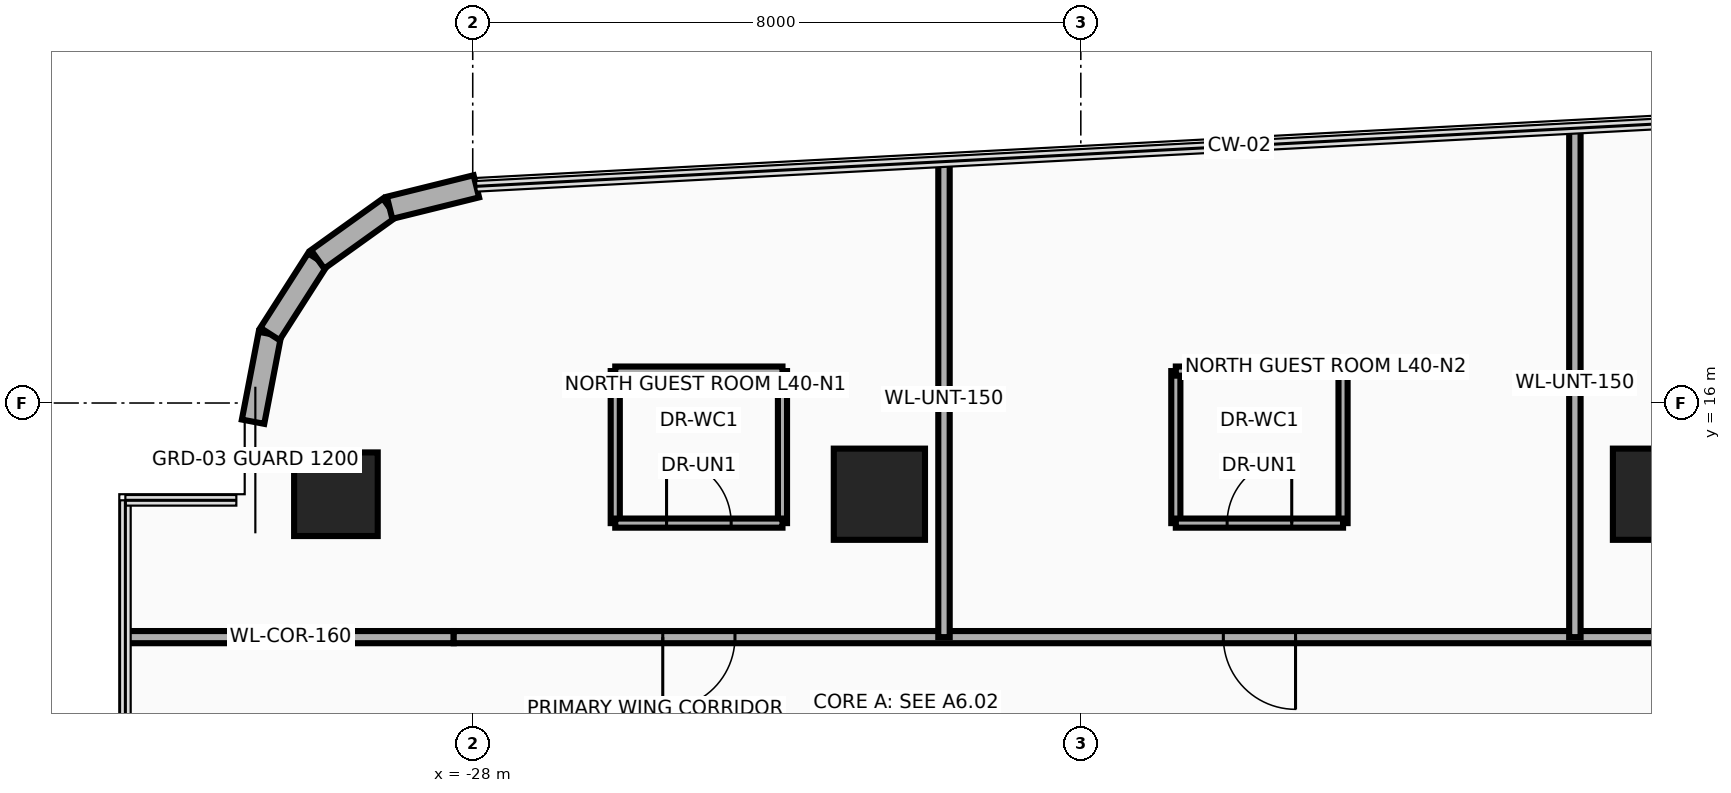
"""IFC4 building model, lengths in metres.
Left out: names, types, materials, properties, quantities, classifications, styles, units other than length and angle.
Written with IfcOpenShell. Run it as: python <this file> out.ifc"""

import sys

from ifc_helpers import new_model, si_unit, direction, frame, frame_2d, origin, origin_2d, place, context, subcontext, project, spatial, rectangle, circle, extrude, source, transform, mapped, element, fill, save


model = new_model("IFC4")
c1 = context("Model", 3, precision=1e-05, world=origin(), true_north=direction((0.0, 1.0)))
c2 = subcontext(c1, "Body", "Model", "MODEL_VIEW")
j1 = project(units=[si_unit("LENGTHUNIT", "METRE"), si_unit("PLANEANGLEUNIT", "RADIAN")], contexts=[c1])
p1 = place(None, origin())
s1 = spatial("IfcSite", under=j1, at=p1, CompositionType="ELEMENT")
p2 = place(p1, origin())
s2 = spatial("IfcBuilding", under=s1, at=p2, CompositionType="ELEMENT")
p3 = place(p2, frame((0.0, 0.0, 157.5)))
s3 = spatial("IfcBuildingStorey", under=s2, at=p3, CompositionType="ELEMENT", Elevation=157.5)
m1 = source(origin(), c2, "Body", "SweptSolid", [
    extrude(circle(Radius=0.55, at=origin_2d()), origin(), (0.0, 0.0, 1.0), 3.7),
])
p4 = place(p3, frame((-29.8, 14.8, 0.0), z_axis=(0.0, 0.0, 1.0), x_axis=(1.0, 0.0, 0.0)))
e1 = element("IfcColumn", 1, at=p4, inside=s3, PredefinedType="COLUMN", context=c2, shape_type="MappedRepresentation", body=[
    mapped(m1, transform((0.0, 0.0, 0.0), x_axis=(1.0, 0.0, 0.0), y_axis=(0.0, 1.0, 0.0), z_axis=(0.0, 0.0, 1.0), scale=1.0)),
])
m2 = source(origin(), c2, "Body", "SweptSolid", [
    extrude(rectangle(XDim=1.2, YDim=1.2, at=origin_2d()), origin(), (0.0, 0.0, 1.0), 3.7),
])
for number, where, z_axis, x_axis in (
    (2, (-22.65, 14.8, 0.0), (0.0, 0.0, 1.0), (1.0, 0.0, 0.0)),
    (3, (-12.4, 14.8, 0.0), (0.0, 0.0, 1.0), (1.0, 0.0, 0.0)),
):
    element("IfcColumn", number, at=place(p3, frame(where, z_axis=z_axis, x_axis=x_axis)), inside=s3, PredefinedType="COLUMN", context=c2, shape_type="MappedRepresentation", body=[
        mapped(m2, transform((0.0, 0.0, 0.0), x_axis=(1.0, 0.0, 0.0), y_axis=(0.0, 1.0, 0.0), z_axis=(0.0, 0.0, 1.0), scale=1.0)),
    ])
p5 = place(p3, frame((-30.89, 15.754, 0.0), z_axis=(0.0, 0.0, 1.0), x_axis=(0.188562397879, 0.982061210977, 0.0)))
e4 = element("IfcWall", 4, at=p5, inside=s3, PredefinedType="SOLIDWALL", context=c2, shape_type="SweptSolid", body=[
    extrude(rectangle(XDim=1.176, YDim=0.3, at=frame_2d((0.588, 0.0))), origin(), (0.0, 0.0, 1.0), 3.46),
])
for number, where, z_axis, x_axis in (
    (5, (-30.668, 16.909, 0.0), (0.0, 0.0, 1.0), (0.539, 0.842, 0.0)),
    (6, (-30.04, 17.89, 0.0), (0.0, 0.0, 1.0), (0.813, 0.583, 0.0)),
):
    element("IfcWall", number, at=place(p3, frame(where, z_axis=z_axis, x_axis=x_axis)), inside=s3, PredefinedType="SOLIDWALL", context=c2, shape_type="SweptSolid", body=[
        extrude(rectangle(XDim=1.165, YDim=0.3, at=frame_2d((0.583, 0.0))), origin(), (0.0, 0.0, 1.0), 3.46),
    ])
p6 = place(p3, frame((-29.094, 18.569, 0.0), z_axis=(0.0, 0.0, 1.0), x_axis=(0.970762249107, 0.24004302887, 0.0)))
e7 = element("IfcWall", 7, at=p6, inside=s3, PredefinedType="SOLIDWALL", context=c2, shape_type="SweptSolid", body=[
    extrude(rectangle(XDim=1.176, YDim=0.3, at=frame_2d((0.588, 0.0))), origin(), (0.0, 0.0, 1.0), 3.46),
])
p7 = place(p3, frame((-32.54, 12.92, 0.0), z_axis=(0.0, 0.0, 1.0), x_axis=(1.0, 0.0, 0.0)))
e8 = element("IfcWall", 8, at=p7, inside=s3, PredefinedType="PARTITIONING", context=c2, shape_type="SweptSolid", body=[
    extrude(rectangle(XDim=4.29, YDim=0.16, at=frame_2d((2.145, 0.0))), origin(), (0.0, 0.0, 1.0), 2.896),
])
p8 = place(p3, frame((-28.25, 12.92, 0.0), z_axis=(0.0, 0.0, 1.0), x_axis=(1.0, 0.0, 0.0)))
e9 = element("IfcWall", 9, at=p8, inside=s3, PredefinedType="PARTITIONING", context=c2, shape_type="SweptSolid", body=[
    extrude(rectangle(XDim=23.64, YDim=0.16, at=frame_2d((11.82, 0.0))), origin(), (0.0, 0.0, 1.0), 2.834),
])
p9 = place(p8, frame((2.75, 0.0, 0.0)))
e10 = element("IfcOpeningElement", 10, at=p9, cuts=e9, PredefinedType="OPENING", context=c2, shape_type="SweptSolid", body=[
    extrude(rectangle(XDim=0.95, YDim=2.15, at=frame_2d((0.475, 1.075))), frame((0.0, 0.095, 0.0), z_axis=(0.0, -1.0, 0.0), x_axis=(1.0, 0.0, 0.0)), (0.0, 0.0, 1.0), 0.19),
])
p10 = place(p8, frame((10.125, 0.0, 0.0)))
e11 = element("IfcOpeningElement", 11, at=p10, cuts=e9, PredefinedType="OPENING", context=c2, shape_type="SweptSolid", body=[
    extrude(rectangle(XDim=0.95, YDim=2.15, at=frame_2d((0.475, 1.075))), frame((0.0, 0.095, 0.0), z_axis=(0.0, -1.0, 0.0), x_axis=(1.0, 0.0, 0.0)), (0.0, 0.0, 1.0), 0.19),
])
p11 = place(p8, frame((17.62, 0.0, 0.0)))
e12 = element("IfcOpeningElement", 12, at=p11, cuts=e9, PredefinedType="OPENING", context=c2, shape_type="SweptSolid", body=[
    extrude(rectangle(XDim=0.95, YDim=2.15, at=frame_2d((0.475, 1.075))), frame((0.0, 0.095, 0.0), z_axis=(0.0, -1.0, 0.0), x_axis=(1.0, 0.0, 0.0)), (0.0, 0.0, 1.0), 0.19),
])
p12 = place(p3, frame((-21.8, 12.92, 0.0), z_axis=(0.0, 0.0, 1.0), x_axis=(0.0, 1.0, 0.0)))
e13 = element("IfcWall", 13, at=p12, inside=s3, PredefinedType="PARTITIONING", context=c2, shape_type="SweptSolid", body=[
    extrude(rectangle(XDim=6.256, YDim=0.15, at=frame_2d((3.128, 0.0))), origin(), (0.0, 0.0, 1.0), 2.666),
])
p13 = place(p3, frame((-13.5, 12.92, 0.0), z_axis=(0.0, 0.0, 1.0), x_axis=(0.0, 1.0, 0.0)))
e14 = element("IfcWall", 14, at=p13, inside=s3, PredefinedType="PARTITIONING", context=c2, shape_type="SweptSolid", body=[
    extrude(rectangle(XDim=6.694, YDim=0.15, at=frame_2d((3.347, 0.0))), origin(), (0.0, 0.0, 1.0), 2.666),
])
for number, where, z_axis, x_axis in (
    (15, (-26.125, 14.42, 0.0), (0.0, 0.0, 1.0), (0.0, 1.0, 0.0)),
    (16, (-23.925, 14.42, 0.0), (0.0, 0.0, 1.0), (0.0, 1.0, 0.0)),
):
    element("IfcWall", number, at=place(p3, frame(where, z_axis=z_axis, x_axis=x_axis)), inside=s3, PredefinedType="PARTITIONING", context=c2, shape_type="SweptSolid", body=[
        extrude(rectangle(XDim=2.0, YDim=0.12, at=frame_2d((1.0, 0.0))), origin(), (0.0, 0.0, 1.0), 2.666),
    ])
p14 = place(p3, frame((-26.125, 16.42, 0.0), z_axis=(0.0, 0.0, 1.0), x_axis=(1.0, 0.0, 0.0)))
e17 = element("IfcWall", 17, at=p14, inside=s3, PredefinedType="PARTITIONING", context=c2, shape_type="SweptSolid", body=[
    extrude(rectangle(XDim=2.2, YDim=0.12, at=frame_2d((1.1, 0.0))), origin(), (0.0, 0.0, 1.0), 3.46),
])
p15 = place(p3, frame((-26.125, 14.42, 0.0), z_axis=(0.0, 0.0, 1.0), x_axis=(1.0, 0.0, 0.0)))
e18 = element("IfcWall", 18, at=p15, inside=s3, PredefinedType="PARTITIONING", context=c2, shape_type="SweptSolid", body=[
    extrude(rectangle(XDim=2.2, YDim=0.12, at=frame_2d((1.1, 0.0))), origin(), (0.0, 0.0, 1.0), 3.46),
])
p16 = place(p15, frame((0.675, 0.0, 0.0)))
e19 = element("IfcOpeningElement", 19, at=p16, cuts=e18, PredefinedType="OPENING", context=c2, shape_type="SweptSolid", body=[
    extrude(rectangle(XDim=0.85, YDim=2.1, at=frame_2d((0.425, 1.05))), frame((0.0, 0.075, 0.0), z_axis=(0.0, -1.0, 0.0), x_axis=(1.0, 0.0, 0.0)), (0.0, 0.0, 1.0), 0.15),
])
for number, where, z_axis, x_axis in (
    (20, (-18.75, 14.42, 0.0), (0.0, 0.0, 1.0), (0.0, 1.0, 0.0)),
    (21, (-16.55, 14.42, 0.0), (0.0, 0.0, 1.0), (0.0, 1.0, 0.0)),
):
    element("IfcWall", number, at=place(p3, frame(where, z_axis=z_axis, x_axis=x_axis)), inside=s3, PredefinedType="PARTITIONING", context=c2, shape_type="SweptSolid", body=[
        extrude(rectangle(XDim=2.0, YDim=0.12, at=frame_2d((1.0, 0.0))), origin(), (0.0, 0.0, 1.0), 2.666),
    ])
p17 = place(p3, frame((-18.75, 16.42, 0.0), z_axis=(0.0, 0.0, 1.0), x_axis=(1.0, 0.0, 0.0)))
e22 = element("IfcWall", 22, at=p17, inside=s3, PredefinedType="PARTITIONING", context=c2, shape_type="SweptSolid", body=[
    extrude(rectangle(XDim=2.2, YDim=0.12, at=frame_2d((1.1, 0.0))), origin(), (0.0, 0.0, 1.0), 3.46),
])
p18 = place(p3, frame((-18.75, 14.42, 0.0), z_axis=(0.0, 0.0, 1.0), x_axis=(1.0, 0.0, 0.0)))
e23 = element("IfcWall", 23, at=p18, inside=s3, PredefinedType="PARTITIONING", context=c2, shape_type="SweptSolid", body=[
    extrude(rectangle(XDim=2.2, YDim=0.12, at=frame_2d((1.1, 0.0))), origin(), (0.0, 0.0, 1.0), 3.46),
])
p19 = place(p18, frame((0.675, 0.0, 0.0)))
e24 = element("IfcOpeningElement", 24, at=p19, cuts=e23, PredefinedType="OPENING", context=c2, shape_type="SweptSolid", body=[
    extrude(rectangle(XDim=0.85, YDim=2.1, at=frame_2d((0.425, 1.05))), frame((0.0, 0.075, 0.0), z_axis=(0.0, -1.0, 0.0), x_axis=(1.0, 0.0, 0.0)), (0.0, 0.0, 1.0), 0.15),
])
p20 = place(p9, frame((0.95, 0.0, 0.0), z_axis=(0.0, 0.0, 1.0), x_axis=(-1.0, 0.0, 0.0)))
e25 = element("IfcDoor", 25, at=p20, inside=s3, OperationType="SINGLE_SWING_LEFT", PredefinedType="DOOR", context=c2, shape_type="SweptSolid", body=[
    extrude(rectangle(XDim=0.95, YDim=2.15, at=frame_2d((0.475, 1.075))), frame((0.0, 0.025, 0.0), z_axis=(0.0, -1.0, 0.0), x_axis=(1.0, 0.0, 0.0)), (0.0, 0.0, 1.0), 0.05),
])
fill(e10, e25)
p21 = place(p16, origin())
e26 = element("IfcDoor", 26, at=p21, inside=s3, OperationType="SINGLE_SWING_RIGHT", PredefinedType="DOOR", context=c2, shape_type="SweptSolid", body=[
    extrude(rectangle(XDim=0.85, YDim=2.1, at=frame_2d((0.425, 1.05))), frame((0.0, 0.025, 0.0), z_axis=(0.0, -1.0, 0.0), x_axis=(1.0, 0.0, 0.0)), (0.0, 0.0, 1.0), 0.05),
])
fill(e19, e26)
p22 = place(p10, frame((0.95, 0.0, 0.0), z_axis=(0.0, 0.0, 1.0), x_axis=(-1.0, 0.0, 0.0)))
e27 = element("IfcDoor", 27, at=p22, inside=s3, OperationType="SINGLE_SWING_LEFT", PredefinedType="DOOR", context=c2, shape_type="SweptSolid", body=[
    extrude(rectangle(XDim=0.95, YDim=2.15, at=frame_2d((0.475, 1.075))), frame((0.0, 0.025, 0.0), z_axis=(0.0, -1.0, 0.0), x_axis=(1.0, 0.0, 0.0)), (0.0, 0.0, 1.0), 0.05),
])
fill(e11, e27)
p23 = place(p19, origin())
e28 = element("IfcDoor", 28, at=p23, inside=s3, OperationType="SINGLE_SWING_RIGHT", PredefinedType="DOOR", context=c2, shape_type="SweptSolid", body=[
    extrude(rectangle(XDim=0.85, YDim=2.1, at=frame_2d((0.425, 1.05))), frame((0.0, 0.025, 0.0), z_axis=(0.0, -1.0, 0.0), x_axis=(1.0, 0.0, 0.0)), (0.0, 0.0, 1.0), 0.05),
])
fill(e24, e28)
save(model, sys.argv[1])
